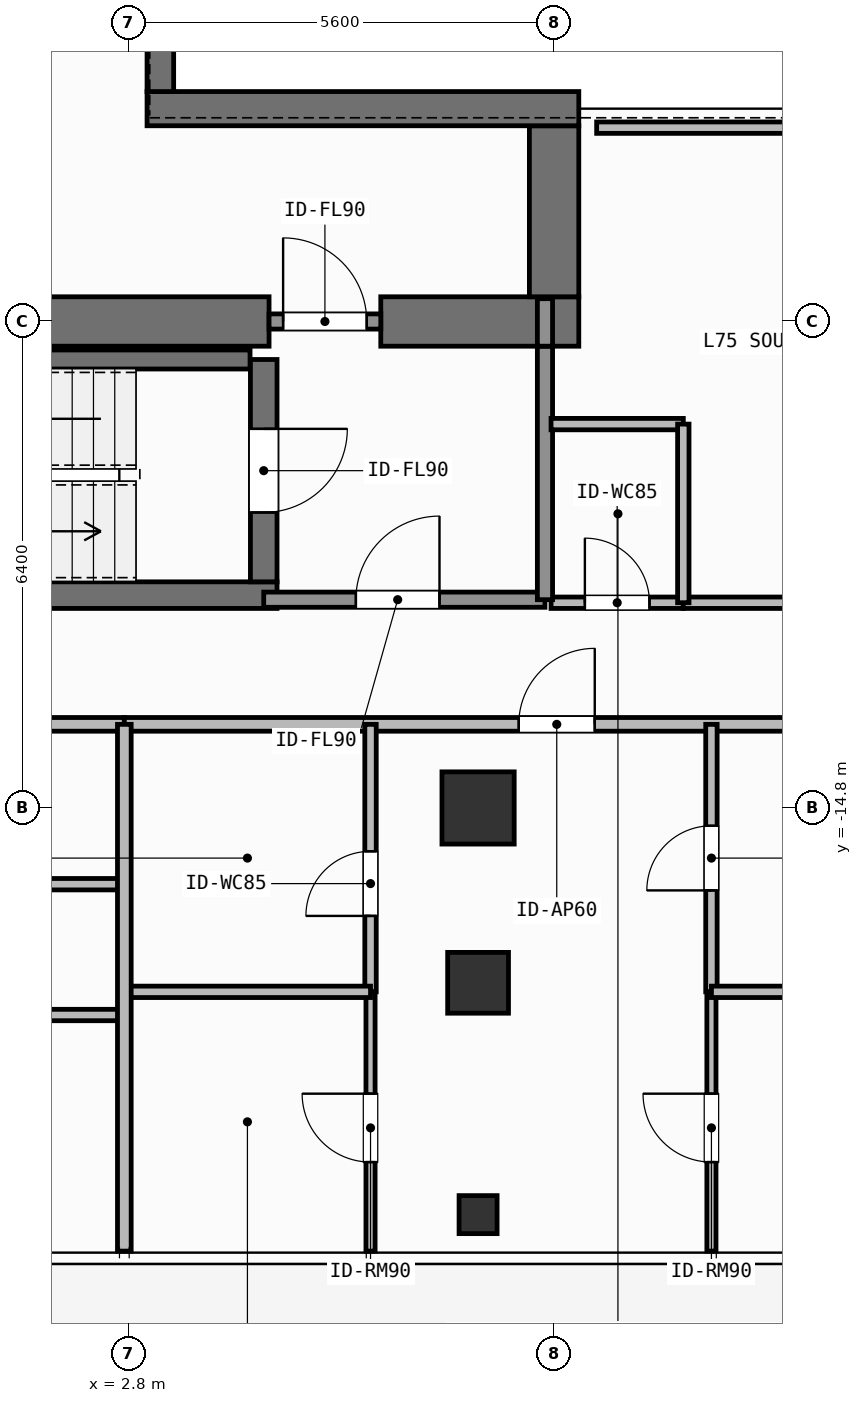
"""IFC4 building model, lengths in metres.
Left out: names, types, materials, properties, quantities, classifications, styles, units other than length and angle.
Written with IfcOpenShell. Run it as: python <this file> out.ifc"""

import sys

from ifc_helpers import new_model, si_unit, direction, frame, frame_2d, origin, origin_2d, place, context, subcontext, project, spatial, rectangle, hollow_rectangle, extrude, element, fill, save


model = new_model("IFC4")
c1 = context("Model", 3, precision=1e-05, world=origin(), true_north=direction((0.0, 1.0)))
c2 = subcontext(c1, "Body", "Model", "MODEL_VIEW")
j1 = project(units=[si_unit("LENGTHUNIT", "METRE"), si_unit("PLANEANGLEUNIT", "RADIAN")], contexts=[c1])
p1 = place(None, origin())
s1 = spatial("IfcSite", under=j1, at=p1, CompositionType="ELEMENT")
p2 = place(p1, origin())
s2 = spatial("IfcBuilding", under=s1, at=p2, CompositionType="ELEMENT")
p3 = place(p2, frame((0.0, 0.0, 305.4)))
s3 = spatial("IfcBuildingStorey", under=s2, at=p3, CompositionType="ELEMENT", Elevation=305.4)
p4 = place(p3, frame((-2.62, -8.4, 0.0), z_axis=(0.0, 0.0, 1.0), x_axis=(1.0, 0.0, 0.0)))
e1 = element("IfcWall", 1, at=p4, inside=s3, PredefinedType="SHEAR", context=c2, shape_type="SweptSolid", body=[
    extrude(rectangle(XDim=7.27, YDim=0.65, at=frame_2d((3.635, 0.0))), origin(), (0.0, 0.0, 1.0), 3.9),
])
p5 = place(p3, frame((6.12, -8.4, 0.0), z_axis=(0.0, 0.0, 1.0), x_axis=(1.0, 0.0, 0.0)))
e2 = element("IfcWall", 2, at=p5, inside=s3, PredefinedType="SHEAR", context=c2, shape_type="SweptSolid", body=[
    extrude(rectangle(XDim=2.605, YDim=0.65, at=frame_2d((1.302, 0.0))), origin(), (0.0, 0.0, 1.0), 3.9),
])
p6 = place(p3, frame((8.4, -8.075, 0.0), z_axis=(0.0, 0.0, 1.0), x_axis=(0.0, 1.0, 0.0)))
e3 = element("IfcWall", 3, at=p6, inside=s3, PredefinedType="SHEAR", context=c2, shape_type="SweptSolid", body=[
    extrude(rectangle(XDim=2.25, YDim=0.65, at=frame_2d((1.125, 0.0))), origin(), (0.0, 0.0, 1.0), 3.9),
])
p7 = place(p3, frame((3.045, -5.6, 0.0), z_axis=(0.0, 0.0, 1.0), x_axis=(1.0, 0.0, 0.0)))
e4 = element("IfcWall", 4, at=p7, inside=s3, PredefinedType="SHEAR", context=c2, shape_type="SweptSolid", body=[
    extrude(rectangle(XDim=5.68, YDim=0.45, at=frame_2d((2.84, 0.0))), origin(), (0.0, 0.0, 1.0), 3.9),
])
p8 = place(p3, frame((3.22, -5.375, 0.0), z_axis=(0.0, 0.0, 1.0), x_axis=(0.0, 1.0, 0.0)))
e5 = element("IfcWall", 5, at=p8, inside=s3, PredefinedType="SHEAR", context=c2, shape_type="SweptSolid", body=[
    extrude(rectangle(XDim=10.75, YDim=0.35, at=frame_2d((5.375, 0.0))), origin(), (0.0, 0.0, 1.0), 3.9),
])
p9 = place(p3, frame((-2.555, -12.0, 0.0), z_axis=(0.0, 0.0, 1.0), x_axis=(1.0, 0.0, 0.0)))
e6 = element("IfcWall", 6, at=p9, inside=s3, PredefinedType="SHEAR", context=c2, shape_type="SweptSolid", body=[
    extrude(rectangle(XDim=7.31, YDim=0.35, at=frame_2d((3.655, 0.0))), origin(), (0.0, 0.0, 1.0), 3.9),
])
p10 = place(p3, frame((-2.2, -8.9, 0.0), z_axis=(0.0, 0.0, 1.0), x_axis=(1.0, 0.0, 0.0)))
e7 = element("IfcWall", 7, at=p10, inside=s3, PredefinedType="SHEAR", context=c2, shape_type="SweptSolid", body=[
    extrude(rectangle(XDim=6.6, YDim=0.25, at=frame_2d((3.3, 0.0))), origin(), (0.0, 0.0, 1.0), 3.9),
])
p11 = place(p3, frame((4.58, -8.9, 0.0), z_axis=(0.0, 0.0, 1.0), x_axis=(0.0, -1.0, 0.0)))
e8 = element("IfcWall", 8, at=p11, inside=s3, PredefinedType="SHEAR", context=c2, shape_type="SweptSolid", body=[
    extrude(rectangle(XDim=2.925, YDim=0.35, at=frame_2d((1.462, 0.0))), origin(), (0.0, 0.0, 1.0), 3.9),
])
p12 = place(p11, frame((0.913, 0.0, 0.0)))
e9 = element("IfcOpeningElement", 9, at=p12, cuts=e8, PredefinedType="OPENING", context=c2, shape_type="SweptSolid", body=[
    extrude(rectangle(XDim=1.1, YDim=2.15, at=frame_2d((0.55, 1.075))), frame((0.0, 0.185, 0.0), z_axis=(0.0, -1.0, 0.0), x_axis=(1.0, 0.0, 0.0)), (0.0, 0.0, 1.0), 0.37),
])
p13 = place(p3, frame((7.4, -14.8, 0.0), z_axis=(0.0, 0.0, 1.0), x_axis=(1.0, 0.0, 0.0)))
e10 = element("IfcColumn", 10, at=p13, inside=s3, PredefinedType="COLUMN", context=c2, shape_type="SweptSolid", body=[
    extrude(rectangle(XDim=0.95, YDim=0.95, at=origin_2d()), origin(), (0.0, 0.0, 1.0), 3.9),
])
p14 = place(p3, frame((7.4, -17.1, 0.0), z_axis=(0.0, 0.0, 1.0), x_axis=(1.0, 0.0, 0.0)))
e11 = element("IfcColumn", 11, at=p14, inside=s3, PredefinedType="COLUMN", context=c2, shape_type="SweptSolid", body=[
    extrude(hollow_rectangle(XDim=0.8, YDim=0.8, WallThickness=0.036, at=origin_2d()), origin(), (0.0, 0.0, 1.0), 3.9),
])
p15 = place(p3, frame((7.4, -20.15, 0.0), z_axis=(0.0, 0.0, 1.0), x_axis=(1.0, 0.0, 0.0)))
e12 = element("IfcColumn", 12, at=p15, inside=s3, PredefinedType="COLUMN", context=c2, shape_type="SweptSolid", body=[
    extrude(hollow_rectangle(XDim=0.5, YDim=0.5, WallThickness=0.025, at=origin_2d()), origin(), (0.0, 0.0, 1.0), 3.9),
])
p16 = place(p3, frame((4.58, -12.06, 0.0), z_axis=(0.0, 0.0, 1.0), x_axis=(1.0, 0.0, 0.0)))
e13 = element("IfcWall", 13, at=p16, inside=s3, PredefinedType="SOLIDWALL", context=c2, shape_type="SweptSolid", body=[
    extrude(rectangle(XDim=3.7, YDim=0.2, at=frame_2d((1.85, 0.0))), origin(), (0.0, 0.0, 1.0), 3.68),
])
p17 = place(p16, frame((1.212, 0.0, 0.0)))
e14 = element("IfcOpeningElement", 14, at=p17, cuts=e13, PredefinedType="OPENING", context=c2, shape_type="SweptSolid", body=[
    extrude(rectangle(XDim=1.1, YDim=2.15, at=frame_2d((0.55, 1.075))), frame((0.0, 0.11, 0.0), z_axis=(0.0, -1.0, 0.0), x_axis=(1.0, 0.0, 0.0)), (0.0, 0.0, 1.0), 0.22),
])
p18 = place(p3, frame((4.65, -8.4, 0.0), z_axis=(0.0, 0.0, 1.0), x_axis=(1.0, 0.0, 0.0)))
e15 = element("IfcWall", 15, at=p18, inside=s3, PredefinedType="SOLIDWALL", context=c2, shape_type="SweptSolid", body=[
    extrude(rectangle(XDim=1.47, YDim=0.2, at=frame_2d((0.735, 0.0))), origin(), (0.0, 0.0, 1.0), 2.92),
])
p19 = place(p18, frame((0.185, 0.0, 0.0)))
e16 = element("IfcOpeningElement", 16, at=p19, cuts=e15, PredefinedType="OPENING", context=c2, shape_type="SweptSolid", body=[
    extrude(rectangle(XDim=1.1, YDim=2.15, at=frame_2d((0.55, 1.075))), frame((0.0, 0.11, 0.0), z_axis=(0.0, -1.0, 0.0), x_axis=(1.0, 0.0, 0.0)), (0.0, 0.0, 1.0), 0.22),
])
p20 = place(p3, frame((8.36, -12.1, 0.0), z_axis=(0.0, 0.0, 1.0), x_axis=(1.0, 0.0, 0.0)))
e17 = element("IfcWall", 17, at=p20, inside=s3, PredefinedType="PARTITIONING", context=c2, shape_type="SweptSolid", body=[
    extrude(rectangle(XDim=1.74, YDim=0.15, at=frame_2d((0.87, 0.0))), origin(), (0.0, 0.0, 1.0), 3.68),
])
p21 = place(p20, frame((0.445, 0.0, 0.0)))
e18 = element("IfcOpeningElement", 18, at=p21, cuts=e17, PredefinedType="OPENING", context=c2, shape_type="SweptSolid", body=[
    extrude(rectangle(XDim=0.85, YDim=2.1, at=frame_2d((0.425, 1.05))), frame((0.0, 0.085, 0.0), z_axis=(0.0, -1.0, 0.0), x_axis=(1.0, 0.0, 0.0)), (0.0, 0.0, 1.0), 0.17),
])
p22 = place(p3, frame((10.1, -12.1, 0.0), z_axis=(0.0, 0.0, 1.0), x_axis=(1.0, 0.0, 0.0)))
e19 = element("IfcWall", 19, at=p22, inside=s3, PredefinedType="PARTITIONING", context=c2, shape_type="SweptSolid", body=[
    extrude(rectangle(XDim=5.48, YDim=0.15, at=frame_2d((2.74, 0.0))), origin(), (0.0, 0.0, 1.0), 3.68),
])
p23 = place(p22, frame((2.29, 0.0, 0.0)))
e20 = element("IfcOpeningElement", 20, at=p23, cuts=e19, PredefinedType="OPENING", context=c2, shape_type="SweptSolid", body=[
    extrude(rectangle(XDim=0.9, YDim=2.1, at=frame_2d((0.45, 1.05))), frame((0.0, 0.085, 0.0), z_axis=(0.0, -1.0, 0.0), x_axis=(1.0, 0.0, 0.0)), (0.0, 0.0, 1.0), 0.17),
])
p24 = place(p3, frame((-4.402, -13.7, 0.0), z_axis=(0.0, 0.0, 1.0), x_axis=(1.0, 0.0, 0.0)))
e21 = element("IfcWall", 21, at=p24, inside=s3, PredefinedType="PARTITIONING", context=c2, shape_type="SweptSolid", body=[
    extrude(rectangle(XDim=7.148, YDim=0.18, at=frame_2d((3.574, 0.0))), origin(), (0.0, 0.0, 1.0), 3.68),
])
p25 = place(p24, frame((1.219, 0.0, 0.0)))
e22 = element("IfcOpeningElement", 22, at=p25, cuts=e21, PredefinedType="OPENING", context=c2, shape_type="SweptSolid", body=[
    extrude(rectangle(XDim=1.0, YDim=2.2, at=frame_2d((0.5, 1.1))), frame((0.0, 0.1, 0.0), z_axis=(0.0, -1.0, 0.0), x_axis=(1.0, 0.0, 0.0)), (0.0, 0.0, 1.0), 0.2),
])
p26 = place(p3, frame((2.746, -13.7, 0.0), z_axis=(0.0, 0.0, 1.0), x_axis=(1.0, 0.0, 0.0)))
e23 = element("IfcWall", 23, at=p26, inside=s3, PredefinedType="PARTITIONING", context=c2, shape_type="SweptSolid", body=[
    extrude(rectangle(XDim=13.174, YDim=0.18, at=frame_2d((6.587, 0.0))), origin(), (0.0, 0.0, 1.0), 3.68),
])
p27 = place(p26, frame((5.189, 0.0, 0.0)))
e24 = element("IfcOpeningElement", 24, at=p27, cuts=e23, PredefinedType="OPENING", context=c2, shape_type="SweptSolid", body=[
    extrude(rectangle(XDim=1.0, YDim=2.2, at=frame_2d((0.5, 1.1))), frame((0.0, 0.1, 0.0), z_axis=(0.0, -1.0, 0.0), x_axis=(1.0, 0.0, 0.0)), (0.0, 0.0, 1.0), 0.2),
])
p28 = place(p3, frame((5.985, -17.219, 0.0), z_axis=(0.0, 0.0, 1.0), x_axis=(0.0, 1.0, 0.0)))
e25 = element("IfcWall", 25, at=p28, inside=s3, PredefinedType="PARTITIONING", context=c2, shape_type="SweptSolid", body=[
    extrude(rectangle(XDim=3.519, YDim=0.15, at=frame_2d((1.76, 0.0))), origin(), (0.0, 0.0, 1.0), 3.68),
])
p29 = place(p28, frame((0.999, 0.0, 0.0)))
e26 = element("IfcOpeningElement", 26, at=p29, cuts=e25, PredefinedType="OPENING", context=c2, shape_type="SweptSolid", body=[
    extrude(rectangle(XDim=0.85, YDim=2.1, at=frame_2d((0.425, 1.05))), frame((0.0, 0.085, 0.0), z_axis=(0.0, -1.0, 0.0), x_axis=(1.0, 0.0, 0.0)), (0.0, 0.0, 1.0), 0.17),
])
p30 = place(p3, frame((5.985, -20.63, 0.0), z_axis=(0.0, 0.0, 1.0), x_axis=(0.0, 1.0, 0.0)))
e27 = element("IfcWall", 27, at=p30, inside=s3, PredefinedType="PARTITIONING", context=c2, shape_type="SweptSolid", body=[
    extrude(rectangle(XDim=3.411, YDim=0.12, at=frame_2d((1.706, 0.0))), origin(), (0.0, 0.0, 1.0), 3.68),
])
p31 = place(p30, frame((1.171, 0.0, 0.0)))
e28 = element("IfcOpeningElement", 28, at=p31, cuts=e27, PredefinedType="OPENING", context=c2, shape_type="SweptSolid", body=[
    extrude(rectangle(XDim=0.9, YDim=2.1, at=frame_2d((0.45, 1.05))), frame((0.0, 0.07, 0.0), z_axis=(0.0, -1.0, 0.0), x_axis=(1.0, 0.0, 0.0)), (0.0, 0.0, 1.0), 0.14),
])
p32 = place(p3, frame((10.47, -17.219, 0.0), z_axis=(0.0, 0.0, 1.0), x_axis=(0.0, 1.0, 0.0)))
e29 = element("IfcWall", 29, at=p32, inside=s3, PredefinedType="PARTITIONING", context=c2, shape_type="SweptSolid", body=[
    extrude(rectangle(XDim=3.519, YDim=0.15, at=frame_2d((1.76, 0.0))), origin(), (0.0, 0.0, 1.0), 3.68),
])
p33 = place(p32, frame((1.334, 0.0, 0.0)))
e30 = element("IfcOpeningElement", 30, at=p33, cuts=e29, PredefinedType="OPENING", context=c2, shape_type="SweptSolid", body=[
    extrude(rectangle(XDim=0.85, YDim=2.1, at=frame_2d((0.425, 1.05))), frame((0.0, 0.085, 0.0), z_axis=(0.0, -1.0, 0.0), x_axis=(1.0, 0.0, 0.0)), (0.0, 0.0, 1.0), 0.17),
])
p34 = place(p3, frame((10.47, -20.63, 0.0), z_axis=(0.0, 0.0, 1.0), x_axis=(0.0, 1.0, 0.0)))
e31 = element("IfcWall", 31, at=p34, inside=s3, PredefinedType="PARTITIONING", context=c2, shape_type="SweptSolid", body=[
    extrude(rectangle(XDim=3.411, YDim=0.12, at=frame_2d((1.706, 0.0))), origin(), (0.0, 0.0, 1.0), 3.68),
])
p35 = place(p34, frame((1.171, 0.0, 0.0)))
e32 = element("IfcOpeningElement", 32, at=p35, cuts=e31, PredefinedType="OPENING", context=c2, shape_type="SweptSolid", body=[
    extrude(rectangle(XDim=0.9, YDim=2.1, at=frame_2d((0.45, 1.05))), frame((0.0, 0.07, 0.0), z_axis=(0.0, -1.0, 0.0), x_axis=(1.0, 0.0, 0.0)), (0.0, 0.0, 1.0), 0.14),
])
p36 = place(p3, frame((8.28, -12.06, 0.0), z_axis=(0.0, 0.0, 1.0), x_axis=(0.0, 1.0, 0.0)))
e33 = element("IfcWall", 33, at=p36, inside=s3, PredefinedType="SOLIDWALL", context=c2, shape_type="SweptSolid", body=[
    extrude(rectangle(XDim=3.335, YDim=0.2, at=frame_2d((1.667, 0.0))), origin(), (0.0, 0.0, 1.0), 3.68),
])
p37 = place(p3, frame((8.28, -8.725, 0.0), z_axis=(0.0, 0.0, 1.0), x_axis=(0.0, 1.0, 0.0)))
e34 = element("IfcWall", 34, at=p37, inside=s3, PredefinedType="SOLIDWALL", context=c2, shape_type="SweptSolid", body=[
    extrude(rectangle(XDim=0.625, YDim=0.2, at=frame_2d((0.312, 0.0))), origin(), (0.0, 0.0, 1.0), 3.68),
])
p38 = place(p3, frame((8.36, -9.75, 0.0), z_axis=(0.0, 0.0, 1.0), x_axis=(1.0, 0.0, 0.0)))
e35 = element("IfcWall", 35, at=p38, inside=s3, PredefinedType="PARTITIONING", context=c2, shape_type="SweptSolid", body=[
    extrude(rectangle(XDim=1.74, YDim=0.15, at=frame_2d((0.87, 0.0))), origin(), (0.0, 0.0, 1.0), 3.68),
])
p39 = place(p3, frame((10.1, -12.1, 0.0), z_axis=(0.0, 0.0, 1.0), x_axis=(0.0, 1.0, 0.0)))
e36 = element("IfcWall", 36, at=p39, inside=s3, PredefinedType="PARTITIONING", context=c2, shape_type="SweptSolid", body=[
    extrude(rectangle(XDim=2.35, YDim=0.15, at=frame_2d((1.175, 0.0))), origin(), (0.0, 0.0, 1.0), 3.68),
])
p40 = place(p3, frame((8.96, -5.85, 0.0), z_axis=(0.0, 0.0, 1.0), x_axis=(1.0, 0.0, 0.0)))
e37 = element("IfcWall", 37, at=p40, inside=s3, PredefinedType="PARTITIONING", context=c2, shape_type="SweptSolid", body=[
    extrude(rectangle(XDim=6.62, YDim=0.15, at=frame_2d((3.31, 0.0))), origin(), (0.0, 0.0, 1.0), 3.68),
])
p41 = place(p3, frame((-1.652, -15.803, 0.0), z_axis=(0.0, 0.0, 1.0), x_axis=(1.0, 0.0, 0.0)))
e38 = element("IfcWall", 38, at=p41, inside=s3, PredefinedType="PARTITIONING", context=c2, shape_type="SweptSolid", body=[
    extrude(rectangle(XDim=4.398, YDim=0.15, at=frame_2d((2.199, 0.0))), origin(), (0.0, 0.0, 1.0), 3.68),
])
p42 = place(p41, frame((2.312, 0.0, 0.0)))
e39 = element("IfcOpeningElement", 39, at=p42, cuts=e38, PredefinedType="OPENING", context=c2, shape_type="SweptSolid", body=[
    extrude(rectangle(XDim=0.85, YDim=2.1, at=frame_2d((0.425, 1.05))), frame((0.0, 0.085, 0.0), z_axis=(0.0, -1.0, 0.0), x_axis=(1.0, 0.0, 0.0)), (0.0, 0.0, 1.0), 0.17),
])
p43 = place(p3, frame((-1.652, -17.524, 0.0), z_axis=(0.0, 0.0, 1.0), x_axis=(1.0, 0.0, 0.0)))
e40 = element("IfcWall", 40, at=p43, inside=s3, PredefinedType="PARTITIONING", context=c2, shape_type="SweptSolid", body=[
    extrude(rectangle(XDim=4.398, YDim=0.15, at=frame_2d((2.199, 0.0))), origin(), (0.0, 0.0, 1.0), 3.68),
])
p44 = place(p3, frame((2.746, -17.219, 0.0), z_axis=(0.0, 0.0, 1.0), x_axis=(1.0, 0.0, 0.0)))
e41 = element("IfcWall", 41, at=p44, inside=s3, PredefinedType="PARTITIONING", context=c2, shape_type="SweptSolid", body=[
    extrude(rectangle(XDim=3.239, YDim=0.15, at=frame_2d((1.62, 0.0))), origin(), (0.0, 0.0, 1.0), 3.182),
])
p45 = place(p3, frame((10.47, -17.219, 0.0), z_axis=(0.0, 0.0, 1.0), x_axis=(1.0, 0.0, 0.0)))
e42 = element("IfcWall", 42, at=p45, inside=s3, PredefinedType="PARTITIONING", context=c2, shape_type="SweptSolid", body=[
    extrude(rectangle(XDim=5.45, YDim=0.15, at=frame_2d((2.725, 0.0))), origin(), (0.0, 0.0, 1.0), 3.182),
])
p46 = place(p3, frame((2.746, -20.63, 0.0), z_axis=(0.0, 0.0, 1.0), x_axis=(0.0, 1.0, 0.0)))
e43 = element("IfcWall", 43, at=p46, inside=s3, PredefinedType="PARTITIONING", context=c2, shape_type="SweptSolid", body=[
    extrude(rectangle(XDim=6.93, YDim=0.18, at=frame_2d((3.465, 0.0))), origin(), (0.0, 0.0, 1.0), 3.68),
])
p47 = place(p12, origin())
e44 = element("IfcDoor", 44, at=p47, inside=s3, OperationType="SINGLE_SWING_LEFT", PredefinedType="DOOR", context=c2, shape_type="SweptSolid", body=[
    extrude(rectangle(XDim=1.1, YDim=2.15, at=frame_2d((0.55, 1.075))), frame((0.0, 0.025, 0.0), z_axis=(0.0, -1.0, 0.0), x_axis=(1.0, 0.0, 0.0)), (0.0, 0.0, 1.0), 0.05),
])
fill(e9, e44)
p48 = place(p17, origin())
e45 = element("IfcDoor", 45, at=p48, inside=s3, OperationType="SINGLE_SWING_RIGHT", PredefinedType="DOOR", context=c2, shape_type="SweptSolid", body=[
    extrude(rectangle(XDim=1.1, YDim=2.15, at=frame_2d((0.55, 1.075))), frame((0.0, 0.025, 0.0), z_axis=(0.0, -1.0, 0.0), x_axis=(1.0, 0.0, 0.0)), (0.0, 0.0, 1.0), 0.05),
])
fill(e14, e45)
p49 = place(p19, origin())
e46 = element("IfcDoor", 46, at=p49, inside=s3, OperationType="SINGLE_SWING_LEFT", PredefinedType="DOOR", context=c2, shape_type="SweptSolid", body=[
    extrude(rectangle(XDim=1.1, YDim=2.15, at=frame_2d((0.55, 1.075))), frame((0.0, 0.025, 0.0), z_axis=(0.0, -1.0, 0.0), x_axis=(1.0, 0.0, 0.0)), (0.0, 0.0, 1.0), 0.05),
])
fill(e16, e46)
p50 = place(p21, origin())
e47 = element("IfcDoor", 47, at=p50, inside=s3, OperationType="SINGLE_SWING_LEFT", PredefinedType="DOOR", context=c2, shape_type="SweptSolid", body=[
    extrude(rectangle(XDim=0.85, YDim=2.1, at=frame_2d((0.425, 1.05))), frame((0.0, 0.025, 0.0), z_axis=(0.0, -1.0, 0.0), x_axis=(1.0, 0.0, 0.0)), (0.0, 0.0, 1.0), 0.05),
])
fill(e18, e47)
p51 = place(p27, origin())
e48 = element("IfcDoor", 48, at=p51, inside=s3, OperationType="SINGLE_SWING_RIGHT", PredefinedType="DOOR", context=c2, shape_type="SweptSolid", body=[
    extrude(rectangle(XDim=1.0, YDim=2.2, at=frame_2d((0.5, 1.1))), frame((0.0, 0.025, 0.0), z_axis=(0.0, -1.0, 0.0), x_axis=(1.0, 0.0, 0.0)), (0.0, 0.0, 1.0), 0.05),
])
fill(e24, e48)
p52 = place(p29, origin())
e49 = element("IfcDoor", 49, at=p52, inside=s3, OperationType="SINGLE_SWING_LEFT", PredefinedType="DOOR", context=c2, shape_type="SweptSolid", body=[
    extrude(rectangle(XDim=0.85, YDim=2.1, at=frame_2d((0.425, 1.05))), frame((0.0, 0.025, 0.0), z_axis=(0.0, -1.0, 0.0), x_axis=(1.0, 0.0, 0.0)), (0.0, 0.0, 1.0), 0.05),
])
fill(e26, e49)
p53 = place(p31, origin())
e50 = element("IfcDoor", 50, at=p53, inside=s3, OperationType="SINGLE_SWING_RIGHT", PredefinedType="DOOR", context=c2, shape_type="SweptSolid", body=[
    extrude(rectangle(XDim=0.9, YDim=2.1, at=frame_2d((0.45, 1.05))), frame((0.0, 0.025, 0.0), z_axis=(0.0, -1.0, 0.0), x_axis=(1.0, 0.0, 0.0)), (0.0, 0.0, 1.0), 0.05),
])
fill(e28, e50)
p54 = place(p33, origin())
e51 = element("IfcDoor", 51, at=p54, inside=s3, OperationType="SINGLE_SWING_LEFT", PredefinedType="DOOR", context=c2, shape_type="SweptSolid", body=[
    extrude(rectangle(XDim=0.85, YDim=2.1, at=frame_2d((0.425, 1.05))), frame((0.0, 0.025, 0.0), z_axis=(0.0, -1.0, 0.0), x_axis=(1.0, 0.0, 0.0)), (0.0, 0.0, 1.0), 0.05),
])
fill(e30, e51)
p55 = place(p35, origin())
e52 = element("IfcDoor", 52, at=p55, inside=s3, OperationType="SINGLE_SWING_RIGHT", PredefinedType="DOOR", context=c2, shape_type="SweptSolid", body=[
    extrude(rectangle(XDim=0.9, YDim=2.1, at=frame_2d((0.45, 1.05))), frame((0.0, 0.025, 0.0), z_axis=(0.0, -1.0, 0.0), x_axis=(1.0, 0.0, 0.0)), (0.0, 0.0, 1.0), 0.05),
])
fill(e32, e52)
save(model, sys.argv[1])
